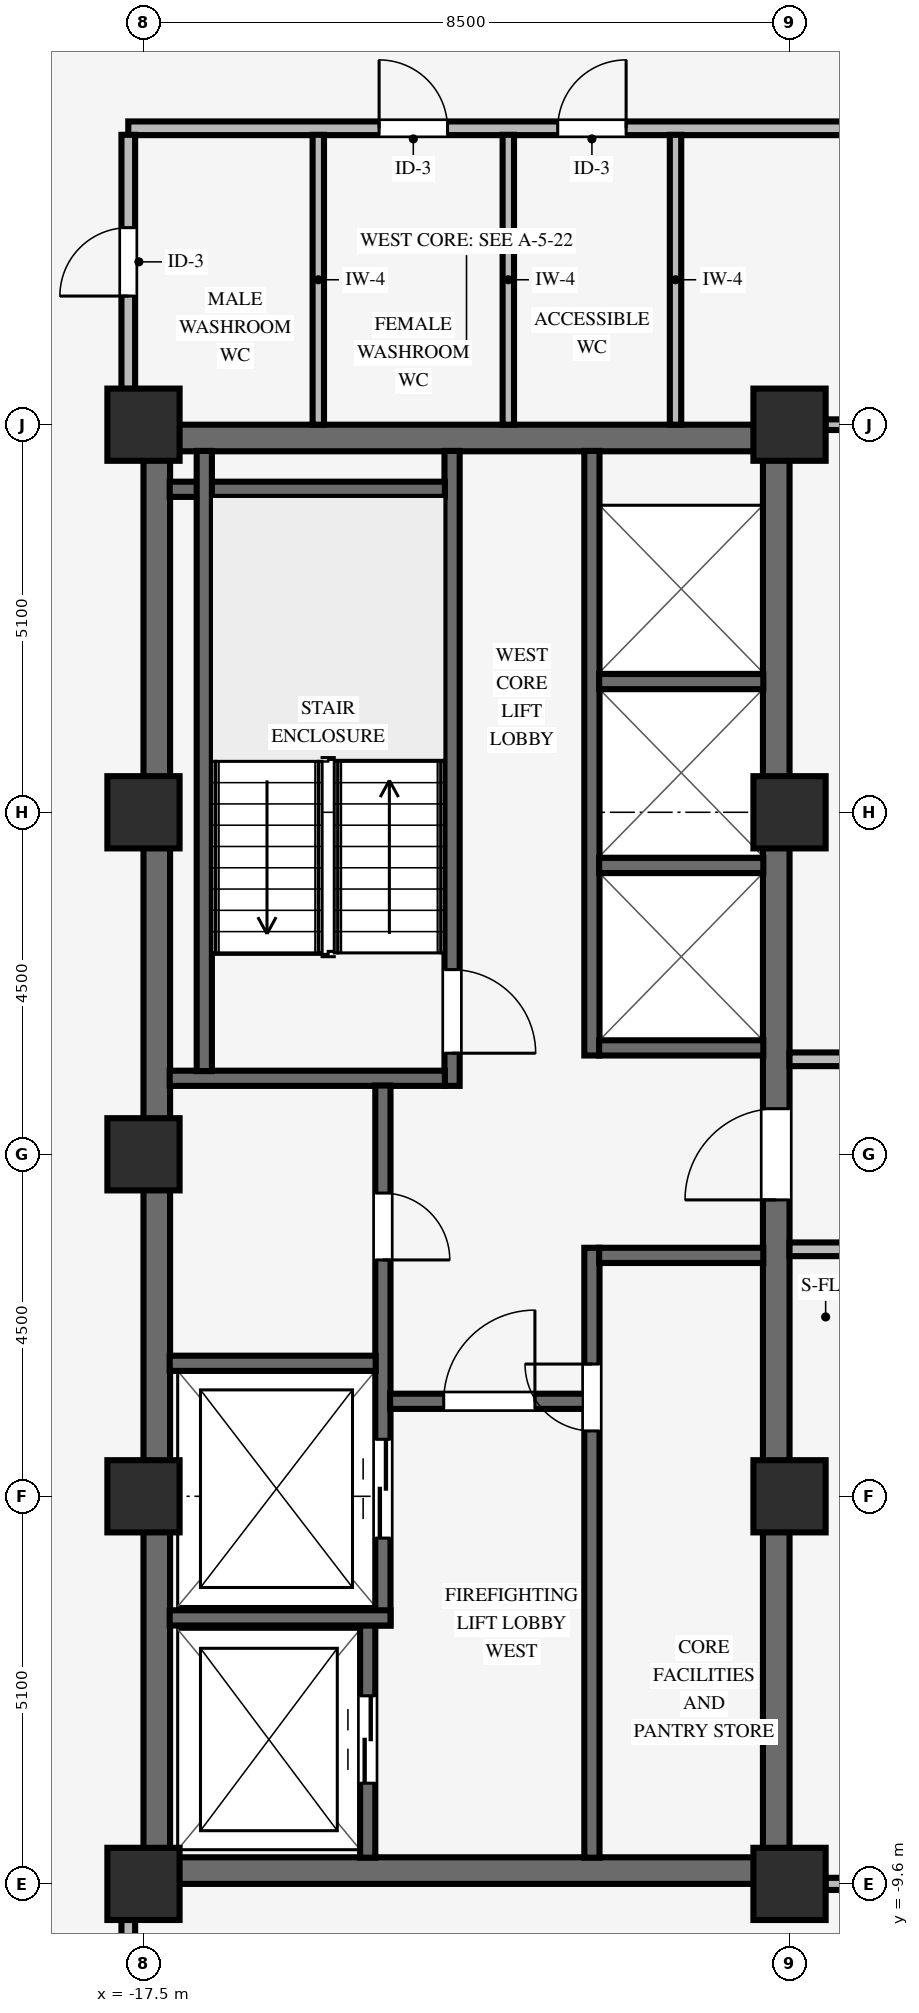
"""IFC4 building model, lengths in metres.
Left out: names, types, materials, properties, quantities, classifications, styles, units other than length and angle.
Written with IfcOpenShell. Run it as: python <this file> out.ifc"""

import sys

from ifc_helpers import new_model, si_unit, direction, frame, frame_2d, origin, origin_2d, place, context, subcontext, project, spatial, rectangle, extrude, source, transform, mapped, element, fill, save


model = new_model("IFC4")
c1 = context("Model", 3, precision=1e-05, world=origin(), true_north=direction((0.0, 1.0)))
c2 = subcontext(c1, "Body", "Model", "MODEL_VIEW")
j1 = project(units=[si_unit("LENGTHUNIT", "METRE"), si_unit("PLANEANGLEUNIT", "RADIAN")], contexts=[c1])
p1 = place(None, origin())
s1 = spatial("IfcSite", under=j1, at=p1, CompositionType="ELEMENT")
p2 = place(p1, origin())
s2 = spatial("IfcBuilding", under=s1, at=p2, CompositionType="ELEMENT")
p3 = place(p2, frame((0.0, 0.0, 194.55)))
s3 = spatial("IfcBuildingStorey", under=s2, at=p3, CompositionType="ELEMENT", Elevation=194.55)
for number, where, z_axis, x_axis in (
    (1, (-17.5, -9.425, 0.0), (0.0, 0.0, 1.0), (1.0, 0.0, 0.0)),
    (2, (-17.5, 9.425, 0.0), (0.0, 0.0, 1.0), (1.0, 0.0, 0.0)),
):
    element("IfcWall", number, at=place(p3, frame(where, z_axis=z_axis, x_axis=x_axis)), inside=s3, PredefinedType="SHEAR", context=c2, shape_type="SweptSolid", body=[
        extrude(rectangle(XDim=8.5, YDim=0.35, at=frame_2d((4.25, 0.0))), origin(), (0.0, 0.0, 1.0), 3.37),
    ])
p4 = place(p3, frame((-17.325, -9.255, 0.0), z_axis=(0.0, 0.0, 1.0), x_axis=(0.0, 1.0, 0.0)))
e3 = element("IfcWall", 3, at=p4, inside=s3, PredefinedType="SHEAR", context=c2, shape_type="SweptSolid", body=[
    extrude(rectangle(XDim=18.51, YDim=0.35, at=frame_2d((9.255, 0.0))), origin(), (0.0, 0.0, 1.0), 3.37),
])
p5 = place(p3, frame((-9.175, -9.255, 0.0), z_axis=(0.0, 0.0, 1.0), x_axis=(0.0, 1.0, 0.0)))
e4 = element("IfcWall", 4, at=p5, inside=s3, PredefinedType="SHEAR", context=c2, shape_type="SweptSolid", body=[
    extrude(rectangle(XDim=18.51, YDim=0.35, at=frame_2d((9.255, 0.0))), origin(), (0.0, 0.0, 1.0), 3.37),
])
p6 = place(p5, frame((8.655, 0.0, 0.0)))
e5 = element("IfcOpeningElement", 5, at=p6, cuts=e4, PredefinedType="OPENING", context=c2, shape_type="SweptSolid", body=[
    extrude(rectangle(XDim=1.2, YDim=2.15, at=frame_2d((0.6, 1.075))), frame((0.0, 0.185, 0.0), z_axis=(0.0, -1.0, 0.0), x_axis=(1.0, 0.0, 0.0)), (0.0, 0.0, 1.0), 0.37),
])
for number, where, z_axis, x_axis in (
    (6, (-17.5, -9.6, 0.0), (0.0, 0.0, 1.0), (1.0, 0.0, 0.0)),
    (7, (-17.5, -4.5, 0.0), (0.0, 0.0, 1.0), (1.0, 0.0, 0.0)),
    (8, (-17.5, 4.5, 0.0), (0.0, 0.0, 1.0), (1.0, 0.0, 0.0)),
    (9, (-17.5, 9.6, 0.0), (0.0, 0.0, 1.0), (1.0, 0.0, 0.0)),
    (10, (-9.0, -9.6, 0.0), (0.0, 0.0, 1.0), (1.0, 0.0, 0.0)),
    (11, (-9.0, -4.5, 0.0), (0.0, 0.0, 1.0), (1.0, 0.0, 0.0)),
    (12, (-9.0, 4.5, 0.0), (0.0, 0.0, 1.0), (1.0, 0.0, 0.0)),
    (13, (-9.0, 9.6, 0.0), (0.0, 0.0, 1.0), (1.0, 0.0, 0.0)),
    (14, (-17.5, 0.0, 0.0), (0.0, 0.0, 1.0), (1.0, 0.0, 0.0)),
):
    element("IfcColumn", number, at=place(p3, frame(where, z_axis=z_axis, x_axis=x_axis)), inside=s3, PredefinedType="COLUMN", context=c2, shape_type="SweptSolid", body=[
        extrude(rectangle(XDim=0.95, YDim=0.95, at=origin_2d()), origin(), (0.0, 0.0, 1.0), 3.37),
    ])
p7 = place(p3, frame((-13.44, 0.9, 0.0), z_axis=(0.0, 0.0, 1.0), x_axis=(0.0, 1.0, 0.0)))
e15 = element("IfcWall", 15, at=p7, inside=s3, PredefinedType="SHEAR", context=c2, shape_type="SweptSolid", body=[
    extrude(rectangle(XDim=8.355, YDim=0.2, at=frame_2d((4.177, 0.0))), origin(), (0.0, 0.0, 1.0), 3.37),
])
p8 = place(p7, frame((1.53, 0.0, 0.0), z_axis=(0.0, 0.0, 1.0), x_axis=(-1.0, 0.0, 0.0)))
e16 = element("IfcOpeningElement", 16, at=p8, cuts=e15, PredefinedType="OPENING", context=c2, shape_type="SweptSolid", body=[
    extrude(rectangle(XDim=1.1, YDim=2.15, at=frame_2d((0.55, 1.075))), frame((0.0, 0.11, 0.0), z_axis=(0.0, -1.0, 0.0), x_axis=(1.0, 0.0, 0.0)), (0.0, 0.0, 1.0), 0.22),
])
for number, where, z_axis, x_axis in (
    (17, (-17.155, 1.0, 0.0), (0.0, 0.0, 1.0), (1.0, 0.0, 0.0)),
    (18, (-17.155, 8.75, 0.0), (0.0, 0.0, 1.0), (1.0, 0.0, 0.0)),
):
    element("IfcWall", number, at=place(p3, frame(where, z_axis=z_axis, x_axis=x_axis)), inside=s3, PredefinedType="SHEAR", context=c2, shape_type="SweptSolid", body=[
        extrude(rectangle(XDim=3.62, YDim=0.2, at=frame_2d((1.81, 0.0))), origin(), (0.0, 0.0, 1.0), 3.37),
    ])
p9 = place(p3, frame((-16.7, 1.095, 0.0), z_axis=(0.0, 0.0, 1.0), x_axis=(0.0, 1.0, 0.0)))
e19 = element("IfcWall", 19, at=p9, inside=s3, PredefinedType="SHEAR", context=c2, shape_type="SweptSolid", body=[
    extrude(rectangle(XDim=8.16, YDim=0.2, at=frame_2d((4.08, 0.0))), origin(), (0.0, 0.0, 1.0), 3.37),
])
p10 = place(p3, frame((-14.55, -9.255, 0.0), z_axis=(0.0, 0.0, 1.0), x_axis=(0.0, 1.0, 0.0)))
e20 = element("IfcWall", 20, at=p10, inside=s3, PredefinedType="SHEAR", context=c2, shape_type="SweptSolid", body=[
    extrude(rectangle(XDim=3.06, YDim=0.2, at=frame_2d((1.53, 0.0))), origin(), (0.0, 0.0, 1.0), 3.37),
])
p11 = place(p10, frame((0.98, 0.0, 0.0)))
e21 = element("IfcOpeningElement", 21, at=p11, cuts=e20, PredefinedType="OPENING", context=c2, shape_type="SweptSolid", body=[
    extrude(rectangle(XDim=1.15, YDim=2.15, at=frame_2d((0.575, 1.075))), frame((0.0, 0.11, 0.0), z_axis=(0.0, -1.0, 0.0), x_axis=(1.0, 0.0, 0.0)), (0.0, 0.0, 1.0), 0.22),
])
p12 = place(p3, frame((-14.35, -6.2, 0.0), z_axis=(0.0, 0.0, 1.0), x_axis=(0.0, 1.0, 0.0)))
e22 = element("IfcWall", 22, at=p12, inside=s3, PredefinedType="SHEAR", context=c2, shape_type="SweptSolid", body=[
    extrude(rectangle(XDim=7.105, YDim=0.2, at=frame_2d((3.552, 0.0))), origin(), (0.0, 0.0, 1.0), 3.37),
])
p13 = place(p12, frame((5.69, 0.0, 0.0), z_axis=(0.0, 0.0, 1.0), x_axis=(-1.0, 0.0, 0.0)))
e23 = element("IfcOpeningElement", 23, at=p13, cuts=e22, PredefinedType="OPENING", context=c2, shape_type="SweptSolid", body=[
    extrude(rectangle(XDim=0.88, YDim=2.1, at=frame_2d((0.44, 1.05))), frame((0.0, 0.11, 0.0), z_axis=(0.0, -1.0, 0.0), x_axis=(1.0, 0.0, 0.0)), (0.0, 0.0, 1.0), 0.22),
])
p14 = place(p12, frame((1.15, 0.0, 0.0)))
e24 = element("IfcOpeningElement", 24, at=p14, cuts=e22, PredefinedType="OPENING", context=c2, shape_type="SweptSolid", body=[
    extrude(rectangle(XDim=1.3, YDim=2.2, at=frame_2d((0.65, 1.1))), frame((0.0, 0.11, 0.0), z_axis=(0.0, -1.0, 0.0), x_axis=(1.0, 0.0, 0.0)), (0.0, 0.0, 1.0), 0.22),
])
p15 = place(p3, frame((-17.155, -6.1, 0.0), z_axis=(0.0, 0.0, 1.0), x_axis=(1.0, 0.0, 0.0)))
e25 = element("IfcWall", 25, at=p15, inside=s3, PredefinedType="SHEAR", context=c2, shape_type="SweptSolid", body=[
    extrude(rectangle(XDim=2.905, YDim=0.2, at=frame_2d((1.453, 0.0))), origin(), (0.0, 0.0, 1.0), 3.37),
])
p16 = place(p3, frame((-17.155, -2.75, 0.0), z_axis=(0.0, 0.0, 1.0), x_axis=(1.0, 0.0, 0.0)))
e26 = element("IfcWall", 26, at=p16, inside=s3, PredefinedType="SHEAR", context=c2, shape_type="SweptSolid", body=[
    extrude(rectangle(XDim=2.71, YDim=0.2, at=frame_2d((1.355, 0.0))), origin(), (0.0, 0.0, 1.0), 3.37),
])
p17 = place(p3, frame((-11.6, -9.255, 0.0), z_axis=(0.0, 0.0, 1.0), x_axis=(0.0, 1.0, 0.0)))
e27 = element("IfcWall", 27, at=p17, inside=s3, PredefinedType="SHEAR", context=c2, shape_type="SweptSolid", body=[
    extrude(rectangle(XDim=8.025, YDim=0.2, at=frame_2d((4.012, 0.0))), origin(), (0.0, 0.0, 1.0), 3.37),
])
p18 = place(p17, frame((5.615, 0.0, 0.0)))
e28 = element("IfcOpeningElement", 28, at=p18, cuts=e27, PredefinedType="OPENING", context=c2, shape_type="SweptSolid", body=[
    extrude(rectangle(XDim=0.88, YDim=2.1, at=frame_2d((0.44, 1.05))), frame((0.0, 0.11, 0.0), z_axis=(0.0, -1.0, 0.0), x_axis=(1.0, 0.0, 0.0)), (0.0, 0.0, 1.0), 0.22),
])
p19 = place(p3, frame((-14.255, -3.25, 0.0), z_axis=(0.0, 0.0, 1.0), x_axis=(1.0, 0.0, 0.0)))
e29 = element("IfcWall", 29, at=p19, inside=s3, PredefinedType="SHEAR", context=c2, shape_type="SweptSolid", body=[
    extrude(rectangle(XDim=2.56, YDim=0.2, at=frame_2d((1.28, 0.0))), origin(), (0.0, 0.0, 1.0), 3.37),
])
p20 = place(p19, frame((0.705, 0.0, 0.0)))
e30 = element("IfcOpeningElement", 30, at=p20, cuts=e29, PredefinedType="OPENING", context=c2, shape_type="SweptSolid", body=[
    extrude(rectangle(XDim=1.2, YDim=2.15, at=frame_2d((0.6, 1.075))), frame((0.0, 0.11, 0.0), z_axis=(0.0, -1.0, 0.0), x_axis=(1.0, 0.0, 0.0)), (0.0, 0.0, 1.0), 0.22),
])
p21 = place(p3, frame((-11.505, -1.33, 0.0), z_axis=(0.0, 0.0, 1.0), x_axis=(1.0, 0.0, 0.0)))
e31 = element("IfcWall", 31, at=p21, inside=s3, PredefinedType="SHEAR", context=c2, shape_type="SweptSolid", body=[
    extrude(rectangle(XDim=2.16, YDim=0.2, at=frame_2d((1.08, 0.0))), origin(), (0.0, 0.0, 1.0), 3.37),
])
p22 = place(p3, frame((-11.6, 1.3, 0.0), z_axis=(0.0, 0.0, 1.0), x_axis=(0.0, 1.0, 0.0)))
e32 = element("IfcWall", 32, at=p22, inside=s3, PredefinedType="SHEAR", context=c2, shape_type="SweptSolid", body=[
    extrude(rectangle(XDim=7.955, YDim=0.2, at=frame_2d((3.978, 0.0))), origin(), (0.0, 0.0, 1.0), 3.37),
])
for number, where, z_axis, x_axis in (
    (33, (-11.505, 1.4, 0.0), (0.0, 0.0, 1.0), (1.0, 0.0, 0.0)),
    (34, (-11.505, 3.8, 0.0), (0.0, 0.0, 1.0), (1.0, 0.0, 0.0)),
    (35, (-11.505, 6.22, 0.0), (0.0, 0.0, 1.0), (1.0, 0.0, 0.0)),
):
    element("IfcWall", number, at=place(p3, frame(where, z_axis=z_axis, x_axis=x_axis)), inside=s3, PredefinedType="SHEAR", context=c2, shape_type="SweptSolid", body=[
        extrude(rectangle(XDim=2.16, YDim=0.2, at=frame_2d((1.08, 0.0))), origin(), (0.0, 0.0, 1.0), 3.37),
    ])
p23 = place(p3, frame((-8.529, -9.6, 0.0), z_axis=(0.0, 0.0, 1.0), x_axis=(1.0, 0.0, 0.0)))
e36 = element("IfcWall", 36, at=p23, inside=s3, PredefinedType="PARTITIONING", context=c2, shape_type="SweptSolid", body=[
    extrude(rectangle(XDim=8.378, YDim=0.16, at=frame_2d((4.189, 0.0))), origin(), (0.0, 0.0, 1.0), 2.405),
])
p24 = place(p3, frame((-9.0, -1.25, 0.0), z_axis=(0.0, 0.0, 1.0), x_axis=(1.0, 0.0, 0.0)))
e37 = element("IfcWall", 37, at=p24, inside=s3, PredefinedType="PARTITIONING", context=c2, shape_type="SweptSolid", body=[
    extrude(rectangle(XDim=15.6, YDim=0.18, at=frame_2d((7.8, 0.0))), origin(), (0.0, 0.0, 1.0), 3.36),
])
p25 = place(p24, frame((5.42, 0.0, 0.0)))
e38 = element("IfcOpeningElement", 38, at=p25, cuts=e37, PredefinedType="OPENING", context=c2, shape_type="SweptSolid", body=[
    extrude(rectangle(XDim=0.96, YDim=2.1, at=frame_2d((0.48, 1.05))), frame((0.0, 0.1, 0.0), z_axis=(0.0, -1.0, 0.0), x_axis=(1.0, 0.0, 0.0)), (0.0, 0.0, 1.0), 0.2),
])
p26 = place(p3, frame((-9.0, 1.25, 0.0), z_axis=(0.0, 0.0, 1.0), x_axis=(1.0, 0.0, 0.0)))
e39 = element("IfcWall", 39, at=p26, inside=s3, PredefinedType="PARTITIONING", context=c2, shape_type="SweptSolid", body=[
    extrude(rectangle(XDim=15.6, YDim=0.18, at=frame_2d((7.8, 0.0))), origin(), (0.0, 0.0, 1.0), 3.36),
])
p27 = place(p26, frame((10.42, 0.0, 0.0)))
e40 = element("IfcOpeningElement", 40, at=p27, cuts=e39, PredefinedType="OPENING", context=c2, shape_type="SweptSolid", body=[
    extrude(rectangle(XDim=0.96, YDim=2.1, at=frame_2d((0.48, 1.05))), frame((0.0, 0.1, 0.0), z_axis=(0.0, -1.0, 0.0), x_axis=(1.0, 0.0, 0.0)), (0.0, 0.0, 1.0), 0.2),
])
p28 = place(p26, frame((2.62, 0.0, 0.0)))
e41 = element("IfcOpeningElement", 41, at=p28, cuts=e39, PredefinedType="OPENING", context=c2, shape_type="SweptSolid", body=[
    extrude(rectangle(XDim=0.96, YDim=2.1, at=frame_2d((0.48, 1.05))), frame((0.0, 0.1, 0.0), z_axis=(0.0, -1.0, 0.0), x_axis=(1.0, 0.0, 0.0)), (0.0, 0.0, 1.0), 0.2),
])
p29 = place(p3, frame((-8.529, 9.6, 0.0), z_axis=(0.0, 0.0, 1.0), x_axis=(1.0, 0.0, 0.0)))
e42 = element("IfcWall", 42, at=p29, inside=s3, PredefinedType="PARTITIONING", context=c2, shape_type="SweptSolid", body=[
    extrude(rectangle(XDim=8.378, YDim=0.14, at=frame_2d((4.189, 0.0))), origin(), (0.0, 0.0, 1.0), 2.405),
])
p30 = place(p3, frame((-17.7, 13.5, 0.0), z_axis=(0.0, 0.0, 1.0), x_axis=(1.0, 0.0, 0.0)))
e43 = element("IfcWall", 43, at=p30, inside=s3, PredefinedType="PARTITIONING", context=c2, shape_type="SweptSolid", body=[
    extrude(rectangle(XDim=24.3, YDim=0.18, at=frame_2d((12.15, 0.0))), origin(), (0.0, 0.0, 1.0), 3.008),
])
p31 = place(p30, frame((11.97, 0.0, 0.0)))
e44 = element("IfcOpeningElement", 44, at=p31, cuts=e43, PredefinedType="OPENING", context=c2, shape_type="SweptSolid", body=[
    extrude(rectangle(XDim=0.96, YDim=2.1, at=frame_2d((0.48, 1.05))), frame((0.0, 0.1, 0.0), z_axis=(0.0, -1.0, 0.0), x_axis=(1.0, 0.0, 0.0)), (0.0, 0.0, 1.0), 0.2),
])
p32 = place(p30, frame((20.52, 0.0, 0.0)))
e45 = element("IfcOpeningElement", 45, at=p32, cuts=e43, PredefinedType="OPENING", context=c2, shape_type="SweptSolid", body=[
    extrude(rectangle(XDim=0.96, YDim=2.1, at=frame_2d((0.48, 1.05))), frame((0.0, 0.1, 0.0), z_axis=(0.0, -1.0, 0.0), x_axis=(1.0, 0.0, 0.0)), (0.0, 0.0, 1.0), 0.2),
])
p33 = place(p30, frame((3.3, 0.0, 0.0)))
e46 = element("IfcOpeningElement", 46, at=p33, cuts=e43, PredefinedType="OPENING", context=c2, shape_type="SweptSolid", body=[
    extrude(rectangle(XDim=0.9, YDim=2.1, at=frame_2d((0.45, 1.05))), frame((0.0, 0.1, 0.0), z_axis=(0.0, -1.0, 0.0), x_axis=(1.0, 0.0, 0.0)), (0.0, 0.0, 1.0), 0.2),
])
p34 = place(p30, frame((5.65, 0.0, 0.0)))
e47 = element("IfcOpeningElement", 47, at=p34, cuts=e43, PredefinedType="OPENING", context=c2, shape_type="SweptSolid", body=[
    extrude(rectangle(XDim=0.9, YDim=2.1, at=frame_2d((0.45, 1.05))), frame((0.0, 0.1, 0.0), z_axis=(0.0, -1.0, 0.0), x_axis=(1.0, 0.0, 0.0)), (0.0, 0.0, 1.0), 0.2),
])
p35 = place(p3, frame((-17.7, -13.414, 0.0), z_axis=(0.0, 0.0, 1.0), x_axis=(0.0, 1.0, 0.0)))
e48 = element("IfcWall", 48, at=p35, inside=s3, PredefinedType="PARTITIONING", context=c2, shape_type="SweptSolid", body=[
    extrude(rectangle(XDim=3.343, YDim=0.18, at=frame_2d((1.671, 0.0))), origin(), (0.0, 0.0, 1.0), 2.816),
])
p36 = place(p3, frame((-17.7, 10.071, 0.0), z_axis=(0.0, 0.0, 1.0), x_axis=(0.0, 1.0, 0.0)))
e49 = element("IfcWall", 49, at=p36, inside=s3, PredefinedType="PARTITIONING", context=c2, shape_type="SweptSolid", body=[
    extrude(rectangle(XDim=3.343, YDim=0.18, at=frame_2d((1.671, 0.0))), origin(), (0.0, 0.0, 1.0), 2.816),
])
p37 = place(p36, frame((1.221, 0.0, 0.0)))
e50 = element("IfcOpeningElement", 50, at=p37, cuts=e49, PredefinedType="OPENING", context=c2, shape_type="SweptSolid", body=[
    extrude(rectangle(XDim=0.9, YDim=2.1, at=frame_2d((0.45, 1.05))), frame((0.0, 0.1, 0.0), z_axis=(0.0, -1.0, 0.0), x_axis=(1.0, 0.0, 0.0)), (0.0, 0.0, 1.0), 0.2),
])
for number, where, z_axis, x_axis in (
    (51, (-15.2, 9.6, 0.0), (0.0, 0.0, 1.0), (0.0, 1.0, 0.0)),
    (52, (-12.7, 9.6, 0.0), (0.0, 0.0, 1.0), (0.0, 1.0, 0.0)),
    (53, (-10.5, 9.6, 0.0), (0.0, 0.0, 1.0), (0.0, 1.0, 0.0)),
):
    element("IfcWall", number, at=place(p3, frame(where, z_axis=z_axis, x_axis=x_axis)), inside=s3, PredefinedType="PARTITIONING", context=c2, shape_type="SweptSolid", body=[
        extrude(rectangle(XDim=3.814, YDim=0.15, at=frame_2d((1.907, 0.0))), origin(), (0.0, 0.0, 1.0), 3.36),
    ])
m1 = source(origin(), c2, "Body", "SweptSolid", [
    extrude(rectangle(XDim=1.1, YDim=2.15, at=frame_2d((0.55, 1.075))), frame((0.0, 0.025, 0.0), z_axis=(0.0, -1.0, 0.0), x_axis=(1.0, 0.0, 0.0)), (0.0, 0.0, 1.0), 0.05),
])
p38 = place(p8, origin())
e54 = element("IfcDoor", 54, at=p38, inside=s3, OperationType="SINGLE_SWING_RIGHT", PredefinedType="DOOR", context=c2, shape_type="MappedRepresentation", body=[
    mapped(m1, transform((0.0, 0.0, 0.0), scale=1.0)),
])
fill(e16, e54)
m2 = source(origin(), c2, "Body", "SweptSolid", [
    extrude(rectangle(XDim=0.88, YDim=2.1, at=frame_2d((0.44, 1.05))), frame((0.0, 0.025, 0.0), z_axis=(0.0, -1.0, 0.0), x_axis=(1.0, 0.0, 0.0)), (0.0, 0.0, 1.0), 0.05),
])
p39 = place(p13, origin())
e55 = element("IfcDoor", 55, at=p39, inside=s3, OperationType="SINGLE_SWING_RIGHT", PredefinedType="DOOR", context=c2, shape_type="MappedRepresentation", body=[
    mapped(m2, transform((0.0, 0.0, 0.0), scale=1.0)),
])
fill(e23, e55)
m3 = source(origin(), c2, "Body", "SweptSolid", [
    extrude(rectangle(XDim=1.2, YDim=2.15, at=frame_2d((0.6, 1.075))), frame((0.0, 0.025, 0.0), z_axis=(0.0, -1.0, 0.0), x_axis=(1.0, 0.0, 0.0)), (0.0, 0.0, 1.0), 0.05),
])
p40 = place(p20, origin())
e56 = element("IfcDoor", 56, at=p40, inside=s3, OperationType="SINGLE_SWING_RIGHT", PredefinedType="DOOR", context=c2, shape_type="MappedRepresentation", body=[
    mapped(m3, transform((0.0, 0.0, 0.0), scale=1.0)),
])
fill(e30, e56)
p41 = place(p18, origin())
e57 = element("IfcDoor", 57, at=p41, inside=s3, OperationType="SINGLE_SWING_RIGHT", PredefinedType="DOOR", context=c2, shape_type="MappedRepresentation", body=[
    mapped(m2, transform((0.0, 0.0, 0.0), scale=1.0)),
])
fill(e28, e57)
p42 = place(p6, origin())
e58 = element("IfcDoor", 58, at=p42, inside=s3, OperationType="SINGLE_SWING_LEFT", PredefinedType="DOOR", context=c2, shape_type="MappedRepresentation", body=[
    mapped(m3, transform((0.0, 0.0, 0.0), scale=1.0)),
])
fill(e5, e58)
m4 = source(origin(), c2, "Body", "SweptSolid", [
    extrude(rectangle(XDim=1.15, YDim=2.15, at=frame_2d((0.575, 1.075))), frame((0.0, 0.025, 0.0), z_axis=(0.0, -1.0, 0.0), x_axis=(1.0, 0.0, 0.0)), (0.0, 0.0, 1.0), 0.05),
])
p43 = place(p11, origin())
e59 = element("IfcDoor", 59, at=p43, inside=s3, OperationType="DOUBLE_DOOR_SLIDING", PredefinedType="DOOR", context=c2, shape_type="MappedRepresentation", body=[
    mapped(m4, transform((0.0, 0.0, 0.0), scale=1.0)),
])
fill(e21, e59)
m5 = source(origin(), c2, "Body", "SweptSolid", [
    extrude(rectangle(XDim=1.3, YDim=2.2, at=frame_2d((0.65, 1.1))), frame((0.0, 0.025, 0.0), z_axis=(0.0, -1.0, 0.0), x_axis=(1.0, 0.0, 0.0)), (0.0, 0.0, 1.0), 0.05),
])
p44 = place(p14, origin())
e60 = element("IfcDoor", 60, at=p44, inside=s3, OperationType="DOUBLE_DOOR_SLIDING", PredefinedType="DOOR", context=c2, shape_type="MappedRepresentation", body=[
    mapped(m5, transform((0.0, 0.0, 0.0), scale=1.0)),
])
fill(e24, e60)
m6 = source(origin(), c2, "Body", "SweptSolid", [
    extrude(rectangle(XDim=0.9, YDim=2.1, at=frame_2d((0.45, 1.05))), frame((0.0, 0.025, 0.0), z_axis=(0.0, -1.0, 0.0), x_axis=(1.0, 0.0, 0.0)), (0.0, 0.0, 1.0), 0.05),
])
p45 = place(p37, origin())
e61 = element("IfcDoor", 61, at=p45, inside=s3, OperationType="SINGLE_SWING_LEFT", PredefinedType="DOOR", context=c2, shape_type="MappedRepresentation", body=[
    mapped(m6, transform((0.0, 0.0, 0.0), scale=1.0)),
])
fill(e50, e61)
p46 = place(p33, origin())
e62 = element("IfcDoor", 62, at=p46, inside=s3, OperationType="SINGLE_SWING_LEFT", PredefinedType="DOOR", context=c2, shape_type="MappedRepresentation", body=[
    mapped(m6, transform((0.0, 0.0, 0.0), scale=1.0)),
])
fill(e46, e62)
p47 = place(p34, origin())
e63 = element("IfcDoor", 63, at=p47, inside=s3, OperationType="SINGLE_SWING_RIGHT", PredefinedType="DOOR", context=c2, shape_type="MappedRepresentation", body=[
    mapped(m6, transform((0.0, 0.0, 0.0), scale=1.0)),
])
fill(e47, e63)
save(model, sys.argv[1])
